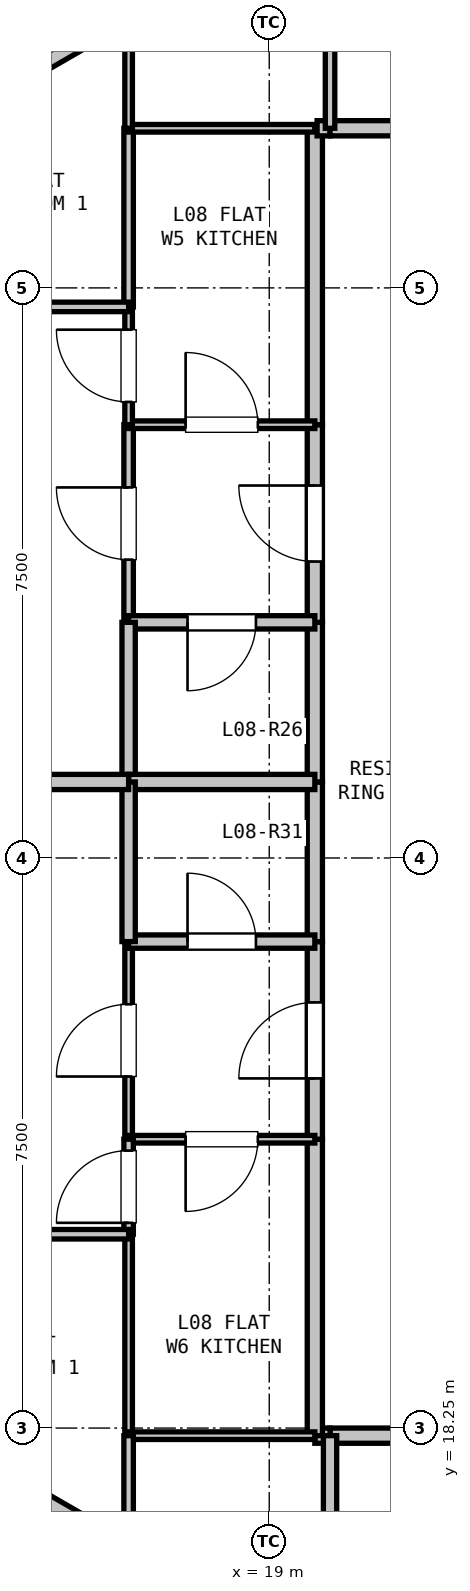
"""IFC4 building model, lengths in metres.
Left out: names, types, materials, properties, quantities, classifications, styles, units other than length and angle.
Written with IfcOpenShell. Run it as: python <this file> out.ifc"""

import sys

from ifc_helpers import new_model, si_unit, direction, frame, frame_2d, origin, place, context, subcontext, project, spatial, rectangle, extrude, element, fill, save


model = new_model("IFC4")
c1 = context("Model", 3, precision=1e-05, world=origin(), true_north=direction((0.0, 1.0)))
c2 = subcontext(c1, "Body", "Model", "MODEL_VIEW")
j1 = project(units=[si_unit("LENGTHUNIT", "METRE"), si_unit("PLANEANGLEUNIT", "RADIAN")], contexts=[c1])
p1 = place(None, origin())
s1 = spatial("IfcSite", under=j1, at=p1, CompositionType="ELEMENT")
p2 = place(p1, origin())
s2 = spatial("IfcBuilding", under=s1, at=p2, CompositionType="ELEMENT")
p3 = place(p2, frame((0.0, 0.0, 32.4)))
s3 = spatial("IfcBuildingStorey", under=s2, at=p3, CompositionType="ELEMENT", Elevation=32.4)
for number, where, z_axis, x_axis in (
    (1, (15.008, 35.611, 0.0), (0.0, 0.0, 1.0), (0.866, 0.5, 0.0)),
    (2, (16.48, 17.039, 0.0), (0.0, 0.0, 1.0), (-0.866, 0.5, 0.0)),
):
    element("IfcWall", number, at=place(p3, frame(where, z_axis=z_axis, x_axis=x_axis)), inside=s3, PredefinedType="PARAPET", context=c2, shape_type="SweptSolid", body=[
        extrude(rectangle(XDim=1.7, YDim=0.2, at=frame_2d((0.85, 0.0))), origin(), (0.0, 0.0, 1.0), 2.66),
    ])
p4 = place(p3, frame((21.8, 18.15, 0.0), z_axis=(0.0, 0.0, 1.0), x_axis=(-1.0, 0.0, 0.0)))
e3 = element("IfcWall", 3, at=p4, inside=s3, PredefinedType="PARTITIONING", context=c2, shape_type="SweptSolid", body=[
    extrude(rectangle(XDim=2.0, YDim=0.2, at=frame_2d((1.0, 0.0))), origin(), (0.0, 0.0, 1.0), 3.04),
])
p5 = place(p3, frame((19.8, 18.15, 0.0), z_axis=(0.0, 0.0, 1.0), x_axis=(-1.0, 0.0, 0.0)))
e4 = element("IfcWall", 4, at=p5, inside=s3, PredefinedType="PARTITIONING", context=c2, shape_type="SweptSolid", body=[
    extrude(rectangle(XDim=0.2, YDim=0.2, at=frame_2d((0.1, 0.0))), origin(), (0.0, 0.0, 1.0), 3.04),
])
p6 = place(p3, frame((19.6, 18.15, 0.0), z_axis=(0.0, 0.0, 1.0), x_axis=(0.0, 1.0, 0.0)))
e5 = element("IfcWall", 5, at=p6, inside=s3, PredefinedType="PARTITIONING", context=c2, shape_type="SweptSolid", body=[
    extrude(rectangle(XDim=3.9, YDim=0.2, at=frame_2d((1.95, 0.0))), origin(), (0.0, 0.0, 1.0), 2.338),
])
p7 = place(p3, frame((19.6, 22.05, 0.0), z_axis=(0.0, 0.0, 1.0), x_axis=(0.0, 1.0, 0.0)))
e6 = element("IfcWall", 6, at=p7, inside=s3, PredefinedType="PARTITIONING", context=c2, shape_type="SweptSolid", body=[
    extrude(rectangle(XDim=2.6, YDim=0.2, at=frame_2d((1.3, 0.0))), origin(), (0.0, 0.0, 1.0), 3.04),
])
p8 = place(p7, frame((0.8, 0.0, 0.0)))
e7 = element("IfcOpeningElement", 7, at=p8, cuts=e6, PredefinedType="OPENING", context=c2, shape_type="SweptSolid", body=[
    extrude(rectangle(XDim=1.0, YDim=2.15, at=frame_2d((0.5, 1.075))), frame((0.0, 0.11, 0.0), z_axis=(0.0, -1.0, 0.0), x_axis=(1.0, 0.0, 0.0)), (0.0, 0.0, 1.0), 0.22),
])
for number, where, z_axis, x_axis in (
    (8, (19.6, 24.65, 0.0), (0.0, 0.0, 1.0), (0.0, 1.0, 0.0)),
    (9, (19.6, 26.75, 0.0), (0.0, 0.0, 1.0), (0.0, 1.0, 0.0)),
):
    element("IfcWall", number, at=place(p3, frame(where, z_axis=z_axis, x_axis=x_axis)), inside=s3, PredefinedType="PARTITIONING", context=c2, shape_type="SweptSolid", body=[
        extrude(rectangle(XDim=2.1, YDim=0.2, at=frame_2d((1.05, 0.0))), origin(), (0.0, 0.0, 1.0), 3.04),
    ])
p9 = place(p3, frame((19.6, 28.85, 0.0), z_axis=(0.0, 0.0, 1.0), x_axis=(0.0, 1.0, 0.0)))
e10 = element("IfcWall", 10, at=p9, inside=s3, PredefinedType="PARTITIONING", context=c2, shape_type="SweptSolid", body=[
    extrude(rectangle(XDim=2.6, YDim=0.2, at=frame_2d((1.3, 0.0))), origin(), (0.0, 0.0, 1.0), 3.04),
])
p10 = place(p9, frame((0.8, 0.0, 0.0)))
e11 = element("IfcOpeningElement", 11, at=p10, cuts=e10, PredefinedType="OPENING", context=c2, shape_type="SweptSolid", body=[
    extrude(rectangle(XDim=1.0, YDim=2.15, at=frame_2d((0.5, 1.075))), frame((0.0, 0.11, 0.0), z_axis=(0.0, -1.0, 0.0), x_axis=(1.0, 0.0, 0.0)), (0.0, 0.0, 1.0), 0.22),
])
p11 = place(p3, frame((19.6, 31.45, 0.0), z_axis=(0.0, 0.0, 1.0), x_axis=(0.0, 1.0, 0.0)))
e12 = element("IfcWall", 12, at=p11, inside=s3, PredefinedType="PARTITIONING", context=c2, shape_type="SweptSolid", body=[
    extrude(rectangle(XDim=3.9, YDim=0.2, at=frame_2d((1.95, 0.0))), origin(), (0.0, 0.0, 1.0), 2.338),
])
p12 = place(p3, frame((19.63, 35.35, 0.0), z_axis=(0.0, 0.0, 1.0), x_axis=(1.0, 0.0, 0.0)))
e13 = element("IfcWall", 13, at=p12, inside=s3, PredefinedType="PARTITIONING", context=c2, shape_type="SweptSolid", body=[
    extrude(rectangle(XDim=0.17, YDim=0.2, at=frame_2d((0.085, 0.0))), origin(), (0.0, 0.0, 1.0), 3.04),
])
p13 = place(p3, frame((19.8, 35.35, 0.0), z_axis=(0.0, 0.0, 1.0), x_axis=(1.0, 0.0, 0.0)))
e14 = element("IfcWall", 14, at=p13, inside=s3, PredefinedType="PARTITIONING", context=c2, shape_type="SweptSolid", body=[
    extrude(rectangle(XDim=3.0, YDim=0.2, at=frame_2d((1.5, 0.0))), origin(), (0.0, 0.0, 1.0), 3.04),
])
p14 = place(p3, frame((17.15, 28.85, 0.0), z_axis=(0.0, 0.0, 1.0), x_axis=(0.0, 1.0, 0.0)))
e15 = element("IfcWall", 15, at=p14, inside=s3, PredefinedType="PARTITIONING", context=c2, shape_type="SweptSolid", body=[
    extrude(rectangle(XDim=2.6, YDim=0.125, at=frame_2d((1.3, 0.0))), origin(), (0.0, 0.0, 1.0), 3.04),
])
p15 = place(p14, frame((0.825, 0.0, 0.0)))
e16 = element("IfcOpeningElement", 16, at=p15, cuts=e15, PredefinedType="OPENING", context=c2, shape_type="SweptSolid", body=[
    extrude(rectangle(XDim=0.95, YDim=2.1, at=frame_2d((0.475, 1.05))), frame((0.0, 0.073, 0.0), z_axis=(0.0, -1.0, 0.0), x_axis=(1.0, 0.0, 0.0)), (0.0, 0.0, 1.0), 0.145),
])
p16 = place(p3, frame((17.15, 31.45, 0.0), z_axis=(0.0, 0.0, 1.0), x_axis=(1.0, 0.0, 0.0)))
e17 = element("IfcWall", 17, at=p16, inside=s3, PredefinedType="PARTITIONING", context=c2, shape_type="SweptSolid", body=[
    extrude(rectangle(XDim=2.45, YDim=0.1, at=frame_2d((1.225, 0.0))), origin(), (0.0, 0.0, 1.0), 3.04),
])
p17 = place(p16, frame((0.75, 0.0, 0.0)))
e18 = element("IfcOpeningElement", 18, at=p17, cuts=e17, PredefinedType="OPENING", context=c2, shape_type="SweptSolid", body=[
    extrude(rectangle(XDim=0.95, YDim=2.1, at=frame_2d((0.475, 1.05))), frame((0.0, 0.06, 0.0), z_axis=(0.0, -1.0, 0.0), x_axis=(1.0, 0.0, 0.0)), (0.0, 0.0, 1.0), 0.12),
])
p18 = place(p3, frame((19.6, 28.85, 0.0), z_axis=(0.0, 0.0, 1.0), x_axis=(-1.0, 0.0, 0.0)))
e19 = element("IfcWall", 19, at=p18, inside=s3, PredefinedType="PLUMBINGWALL", context=c2, shape_type="SweptSolid", body=[
    extrude(rectangle(XDim=2.45, YDim=0.175, at=frame_2d((1.225, 0.0))), origin(), (0.0, 0.0, 1.0), 3.04),
])
p19 = place(p18, frame((0.775, 0.0, 0.0)))
e20 = element("IfcOpeningElement", 20, at=p19, cuts=e19, PredefinedType="OPENING", context=c2, shape_type="SweptSolid", body=[
    extrude(rectangle(XDim=0.9, YDim=2.1, at=frame_2d((0.45, 1.05))), frame((0.0, 0.097, 0.0), z_axis=(0.0, -1.0, 0.0), x_axis=(1.0, 0.0, 0.0)), (0.0, 0.0, 1.0), 0.195),
])
p20 = place(p3, frame((17.15, 22.05, 0.0), z_axis=(0.0, 0.0, 1.0), x_axis=(0.0, 1.0, 0.0)))
e21 = element("IfcWall", 21, at=p20, inside=s3, PredefinedType="PARTITIONING", context=c2, shape_type="SweptSolid", body=[
    extrude(rectangle(XDim=2.6, YDim=0.1, at=frame_2d((1.3, 0.0))), origin(), (0.0, 0.0, 1.0), 3.04),
])
p21 = place(p20, frame((0.825, 0.0, 0.0)))
e22 = element("IfcOpeningElement", 22, at=p21, cuts=e21, PredefinedType="OPENING", context=c2, shape_type="SweptSolid", body=[
    extrude(rectangle(XDim=0.95, YDim=2.1, at=frame_2d((0.475, 1.05))), frame((0.0, 0.06, 0.0), z_axis=(0.0, -1.0, 0.0), x_axis=(1.0, 0.0, 0.0)), (0.0, 0.0, 1.0), 0.12),
])
p22 = place(p3, frame((17.15, 24.65, 0.0), z_axis=(0.0, 0.0, 1.0), x_axis=(1.0, 0.0, 0.0)))
e23 = element("IfcWall", 23, at=p22, inside=s3, PredefinedType="PLUMBINGWALL", context=c2, shape_type="SweptSolid", body=[
    extrude(rectangle(XDim=2.45, YDim=0.175, at=frame_2d((1.225, 0.0))), origin(), (0.0, 0.0, 1.0), 3.04),
])
p23 = place(p22, frame((0.775, 0.0, 0.0)))
e24 = element("IfcOpeningElement", 24, at=p23, cuts=e23, PredefinedType="OPENING", context=c2, shape_type="SweptSolid", body=[
    extrude(rectangle(XDim=0.9, YDim=2.1, at=frame_2d((0.45, 1.05))), frame((0.0, 0.097, 0.0), z_axis=(0.0, -1.0, 0.0), x_axis=(1.0, 0.0, 0.0)), (0.0, 0.0, 1.0), 0.195),
])
p24 = place(p3, frame((19.6, 22.05, 0.0), z_axis=(0.0, 0.0, 1.0), x_axis=(-1.0, 0.0, 0.0)))
e25 = element("IfcWall", 25, at=p24, inside=s3, PredefinedType="PARTITIONING", context=c2, shape_type="SweptSolid", body=[
    extrude(rectangle(XDim=2.45, YDim=0.1, at=frame_2d((1.225, 0.0))), origin(), (0.0, 0.0, 1.0), 3.04),
])
p25 = place(p24, frame((0.75, 0.0, 0.0)))
e26 = element("IfcOpeningElement", 26, at=p25, cuts=e25, PredefinedType="OPENING", context=c2, shape_type="SweptSolid", body=[
    extrude(rectangle(XDim=0.95, YDim=2.1, at=frame_2d((0.475, 1.05))), frame((0.0, 0.06, 0.0), z_axis=(0.0, -1.0, 0.0), x_axis=(1.0, 0.0, 0.0)), (0.0, 0.0, 1.0), 0.12),
])
p26 = place(p3, frame((19.8, 35.35, 0.0), z_axis=(0.0, 0.0, 1.0), x_axis=(0.0, 1.0, 0.0)))
e27 = element("IfcWall", 27, at=p26, inside=s3, PredefinedType="PARTITIONING", context=c2, shape_type="SweptSolid", body=[
    extrude(rectangle(XDim=3.194, YDim=0.125, at=frame_2d((1.597, 0.0))), origin(), (0.0, 0.0, 1.0), 2.365),
])
p27 = place(p3, frame((19.8, 14.956, 0.0), z_axis=(0.0, 0.0, 1.0), x_axis=(0.0, 1.0, 0.0)))
e28 = element("IfcWall", 28, at=p27, inside=s3, PredefinedType="PLUMBINGWALL", context=c2, shape_type="SweptSolid", body=[
    extrude(rectangle(XDim=3.194, YDim=0.175, at=frame_2d((1.597, 0.0))), origin(), (0.0, 0.0, 1.0), 2.365),
])
p28 = place(p3, frame((17.15, 26.75, 0.0), z_axis=(0.0, 0.0, 1.0), x_axis=(0.0, 1.0, 0.0)))
e29 = element("IfcWall", 29, at=p28, inside=s3, PredefinedType="PLUMBINGWALL", context=c2, shape_type="SweptSolid", body=[
    extrude(rectangle(XDim=2.1, YDim=0.175, at=frame_2d((1.05, 0.0))), origin(), (0.0, 0.0, 1.0), 3.04),
])
p29 = place(p3, frame((19.6, 26.75, 0.0), z_axis=(0.0, 0.0, 1.0), x_axis=(-1.0, 0.0, 0.0)))
e30 = element("IfcWall", 30, at=p29, inside=s3, PredefinedType="PARTITIONING", context=c2, shape_type="SweptSolid", body=[
    extrude(rectangle(XDim=2.45, YDim=0.2, at=frame_2d((1.225, 0.0))), origin(), (0.0, 0.0, 1.0), 3.04),
])
p30 = place(p3, frame((17.15, 31.45, 0.0), z_axis=(0.0, 0.0, 1.0), x_axis=(0.0, 1.0, 0.0)))
e31 = element("IfcWall", 31, at=p30, inside=s3, PredefinedType="PARTITIONING", context=c2, shape_type="SweptSolid", body=[
    extrude(rectangle(XDim=1.55, YDim=0.1, at=frame_2d((0.775, 0.0))), origin(), (0.0, 0.0, 1.0), 2.338),
])
p31 = place(p30, frame((0.3, 0.0, 0.0)))
e32 = element("IfcOpeningElement", 32, at=p31, cuts=e31, PredefinedType="OPENING", context=c2, shape_type="SweptSolid", body=[
    extrude(rectangle(XDim=0.95, YDim=2.1, at=frame_2d((0.475, 1.05))), frame((0.0, 0.06, 0.0), z_axis=(0.0, -1.0, 0.0), x_axis=(1.0, 0.0, 0.0)), (0.0, 0.0, 1.0), 0.12),
])
p32 = place(p3, frame((17.15, 33.0, 0.0), z_axis=(0.0, 0.0, 1.0), x_axis=(0.0, 1.0, 0.0)))
e33 = element("IfcWall", 33, at=p32, inside=s3, PredefinedType="PARTITIONING", context=c2, shape_type="SweptSolid", body=[
    extrude(rectangle(XDim=2.35, YDim=0.125, at=frame_2d((1.175, 0.0))), origin(), (0.0, 0.0, 1.0), 3.04),
])
p33 = place(p3, frame((17.15, 35.35, 0.0), z_axis=(0.0, 0.0, 1.0), x_axis=(1.0, 0.0, 0.0)))
e34 = element("IfcWall", 34, at=p33, inside=s3, PredefinedType="PARTITIONING", context=c2, shape_type="SweptSolid", body=[
    extrude(rectangle(XDim=2.45, YDim=0.1, at=frame_2d((1.225, 0.0))), origin(), (0.0, 0.0, 1.0), 3.04),
])
p34 = place(p3, frame((17.15, 24.65, 0.0), z_axis=(0.0, 0.0, 1.0), x_axis=(0.0, 1.0, 0.0)))
e35 = element("IfcWall", 35, at=p34, inside=s3, PredefinedType="PLUMBINGWALL", context=c2, shape_type="SweptSolid", body=[
    extrude(rectangle(XDim=2.1, YDim=0.175, at=frame_2d((1.05, 0.0))), origin(), (0.0, 0.0, 1.0), 3.04),
])
p35 = place(p3, frame((17.15, 18.15, 0.0), z_axis=(0.0, 0.0, 1.0), x_axis=(0.0, 1.0, 0.0)))
e36 = element("IfcWall", 36, at=p35, inside=s3, PredefinedType="PARTITIONING", context=c2, shape_type="SweptSolid", body=[
    extrude(rectangle(XDim=2.65, YDim=0.1, at=frame_2d((1.325, 0.0))), origin(), (0.0, 0.0, 1.0), 3.04),
])
p36 = place(p3, frame((17.15, 20.8, 0.0), z_axis=(0.0, 0.0, 1.0), x_axis=(0.0, 1.0, 0.0)))
e37 = element("IfcWall", 37, at=p36, inside=s3, PredefinedType="PARTITIONING", context=c2, shape_type="SweptSolid", body=[
    extrude(rectangle(XDim=1.25, YDim=0.125, at=frame_2d((0.625, 0.0))), origin(), (0.0, 0.0, 1.0), 2.338),
])
p37 = place(p36, frame((0.15, 0.0, 0.0)))
e38 = element("IfcOpeningElement", 38, at=p37, cuts=e37, PredefinedType="OPENING", context=c2, shape_type="SweptSolid", body=[
    extrude(rectangle(XDim=0.95, YDim=2.1, at=frame_2d((0.475, 1.05))), frame((0.0, 0.073, 0.0), z_axis=(0.0, -1.0, 0.0), x_axis=(1.0, 0.0, 0.0)), (0.0, 0.0, 1.0), 0.145),
])
p38 = place(p3, frame((19.6, 18.15, 0.0), z_axis=(0.0, 0.0, 1.0), x_axis=(-1.0, 0.0, 0.0)))
e39 = element("IfcWall", 39, at=p38, inside=s3, PredefinedType="PARTITIONING", context=c2, shape_type="SweptSolid", body=[
    extrude(rectangle(XDim=2.45, YDim=0.1, at=frame_2d((1.225, 0.0))), origin(), (0.0, 0.0, 1.0), 3.04),
])
p39 = place(p3, frame((10.419, 33.0, 0.0), z_axis=(0.0, 0.0, 1.0), x_axis=(1.0, 0.0, 0.0)))
e40 = element("IfcWall", 40, at=p39, inside=s3, PredefinedType="PARTITIONING", context=c2, shape_type="SweptSolid", body=[
    extrude(rectangle(XDim=6.731, YDim=0.125, at=frame_2d((3.365, 0.0))), origin(), (0.0, 0.0, 1.0), 2.365),
])
p40 = place(p39, frame((2.89, 0.0, 0.0)))
e41 = element("IfcOpeningElement", 41, at=p40, cuts=e40, PredefinedType="OPENING", context=c2, shape_type="SweptSolid", body=[
    extrude(rectangle(XDim=0.95, YDim=2.1, at=frame_2d((0.475, 1.05))), frame((0.0, 0.073, 0.0), z_axis=(0.0, -1.0, 0.0), x_axis=(1.0, 0.0, 0.0)), (0.0, 0.0, 1.0), 0.145),
])
p41 = place(p3, frame((17.15, 26.75, 0.0), z_axis=(0.0, 0.0, 1.0), x_axis=(-1.0, 0.0, 0.0)))
e42 = element("IfcWall", 42, at=p41, inside=s3, PredefinedType="PARTITIONING", context=c2, shape_type="SweptSolid", body=[
    extrude(rectangle(XDim=13.175, YDim=0.2, at=frame_2d((6.588, 0.0))), origin(), (0.0, 0.0, 1.0), 2.65),
])
p42 = place(p3, frame((17.15, 37.014, 0.0), z_axis=(0.0, 0.0, 1.0), x_axis=(0.0, -1.0, 0.0)))
e43 = element("IfcWall", 43, at=p42, inside=s3, PredefinedType="PARTITIONING", context=c2, shape_type="SweptSolid", body=[
    extrude(rectangle(XDim=1.664, YDim=0.1, at=frame_2d((0.832, 0.0))), origin(), (0.0, 0.0, 1.0), 2.365),
])
p43 = place(p3, frame((17.15, 20.8, 0.0), z_axis=(0.0, 0.0, 1.0), x_axis=(-1.0, 0.0, 0.0)))
e44 = element("IfcWall", 44, at=p43, inside=s3, PredefinedType="PARTITIONING", context=c2, shape_type="SweptSolid", body=[
    extrude(rectangle(XDim=7.25, YDim=0.125, at=frame_2d((3.625, 0.0))), origin(), (0.0, 0.0, 1.0), 2.365),
])
p44 = place(p43, frame((3.15, 0.0, 0.0)))
e45 = element("IfcOpeningElement", 45, at=p44, cuts=e44, PredefinedType="OPENING", context=c2, shape_type="SweptSolid", body=[
    extrude(rectangle(XDim=0.95, YDim=2.1, at=frame_2d((0.475, 1.05))), frame((0.0, 0.073, 0.0), z_axis=(0.0, -1.0, 0.0), x_axis=(1.0, 0.0, 0.0)), (0.0, 0.0, 1.0), 0.145),
])
p45 = place(p3, frame((17.15, 18.15, 0.0), z_axis=(0.0, 0.0, 1.0), x_axis=(0.0, -1.0, 0.0)))
e46 = element("IfcWall", 46, at=p45, inside=s3, PredefinedType="PARTITIONING", context=c2, shape_type="SweptSolid", body=[
    extrude(rectangle(XDim=1.664, YDim=0.125, at=frame_2d((0.832, 0.0))), origin(), (0.0, 0.0, 1.0), 2.365),
])
p46 = place(p10, origin())
e47 = element("IfcDoor", 47, at=p46, inside=s3, OperationType="SINGLE_SWING_RIGHT", PredefinedType="DOOR", context=c2, shape_type="SweptSolid", body=[
    extrude(rectangle(XDim=1.0, YDim=2.15, at=frame_2d((0.5, 1.075))), frame((0.0, 0.025, 0.0), z_axis=(0.0, -1.0, 0.0), x_axis=(1.0, 0.0, 0.0)), (0.0, 0.0, 1.0), 0.05),
])
fill(e11, e47)
p47 = place(p8, origin())
e48 = element("IfcDoor", 48, at=p47, inside=s3, OperationType="SINGLE_SWING_LEFT", PredefinedType="DOOR", context=c2, shape_type="SweptSolid", body=[
    extrude(rectangle(XDim=1.0, YDim=2.15, at=frame_2d((0.5, 1.075))), frame((0.0, 0.025, 0.0), z_axis=(0.0, -1.0, 0.0), x_axis=(1.0, 0.0, 0.0)), (0.0, 0.0, 1.0), 0.05),
])
fill(e7, e48)
p48 = place(p19, origin())
e49 = element("IfcDoor", 49, at=p48, inside=s3, OperationType="SINGLE_SWING_RIGHT", PredefinedType="DOOR", context=c2, shape_type="SweptSolid", body=[
    extrude(rectangle(XDim=0.9, YDim=2.1, at=frame_2d((0.45, 1.05))), frame((0.0, 0.025, 0.0), z_axis=(0.0, -1.0, 0.0), x_axis=(1.0, 0.0, 0.0)), (0.0, 0.0, 1.0), 0.05),
])
fill(e20, e49)
p49 = place(p17, origin())
e50 = element("IfcDoor", 50, at=p49, inside=s3, OperationType="SINGLE_SWING_LEFT", PredefinedType="DOOR", context=c2, shape_type="SweptSolid", body=[
    extrude(rectangle(XDim=0.95, YDim=2.1, at=frame_2d((0.475, 1.05))), frame((0.0, 0.025, 0.0), z_axis=(0.0, -1.0, 0.0), x_axis=(1.0, 0.0, 0.0)), (0.0, 0.0, 1.0), 0.05),
])
fill(e18, e50)
p50 = place(p15, origin())
e51 = element("IfcDoor", 51, at=p50, inside=s3, OperationType="SINGLE_SWING_RIGHT", PredefinedType="DOOR", context=c2, shape_type="SweptSolid", body=[
    extrude(rectangle(XDim=0.95, YDim=2.1, at=frame_2d((0.475, 1.05))), frame((0.0, 0.025, 0.0), z_axis=(0.0, -1.0, 0.0), x_axis=(1.0, 0.0, 0.0)), (0.0, 0.0, 1.0), 0.05),
])
fill(e16, e51)
p51 = place(p23, origin())
e52 = element("IfcDoor", 52, at=p51, inside=s3, OperationType="SINGLE_SWING_LEFT", PredefinedType="DOOR", context=c2, shape_type="SweptSolid", body=[
    extrude(rectangle(XDim=0.9, YDim=2.1, at=frame_2d((0.45, 1.05))), frame((0.0, 0.025, 0.0), z_axis=(0.0, -1.0, 0.0), x_axis=(1.0, 0.0, 0.0)), (0.0, 0.0, 1.0), 0.05),
])
fill(e24, e52)
p52 = place(p25, origin())
e53 = element("IfcDoor", 53, at=p52, inside=s3, OperationType="SINGLE_SWING_RIGHT", PredefinedType="DOOR", context=c2, shape_type="SweptSolid", body=[
    extrude(rectangle(XDim=0.95, YDim=2.1, at=frame_2d((0.475, 1.05))), frame((0.0, 0.025, 0.0), z_axis=(0.0, -1.0, 0.0), x_axis=(1.0, 0.0, 0.0)), (0.0, 0.0, 1.0), 0.05),
])
fill(e26, e53)
p53 = place(p21, origin())
e54 = element("IfcDoor", 54, at=p53, inside=s3, OperationType="SINGLE_SWING_LEFT", PredefinedType="DOOR", context=c2, shape_type="SweptSolid", body=[
    extrude(rectangle(XDim=0.95, YDim=2.1, at=frame_2d((0.475, 1.05))), frame((0.0, 0.025, 0.0), z_axis=(0.0, -1.0, 0.0), x_axis=(1.0, 0.0, 0.0)), (0.0, 0.0, 1.0), 0.05),
])
fill(e22, e54)
p54 = place(p31, origin())
e55 = element("IfcDoor", 55, at=p54, inside=s3, OperationType="SINGLE_SWING_RIGHT", PredefinedType="DOOR", context=c2, shape_type="SweptSolid", body=[
    extrude(rectangle(XDim=0.95, YDim=2.1, at=frame_2d((0.475, 1.05))), frame((0.0, 0.025, 0.0), z_axis=(0.0, -1.0, 0.0), x_axis=(1.0, 0.0, 0.0)), (0.0, 0.0, 1.0), 0.05),
])
fill(e32, e55)
p55 = place(p37, origin())
e56 = element("IfcDoor", 56, at=p55, inside=s3, OperationType="SINGLE_SWING_LEFT", PredefinedType="DOOR", context=c2, shape_type="SweptSolid", body=[
    extrude(rectangle(XDim=0.95, YDim=2.1, at=frame_2d((0.475, 1.05))), frame((0.0, 0.025, 0.0), z_axis=(0.0, -1.0, 0.0), x_axis=(1.0, 0.0, 0.0)), (0.0, 0.0, 1.0), 0.05),
])
fill(e38, e56)
save(model, sys.argv[1])
